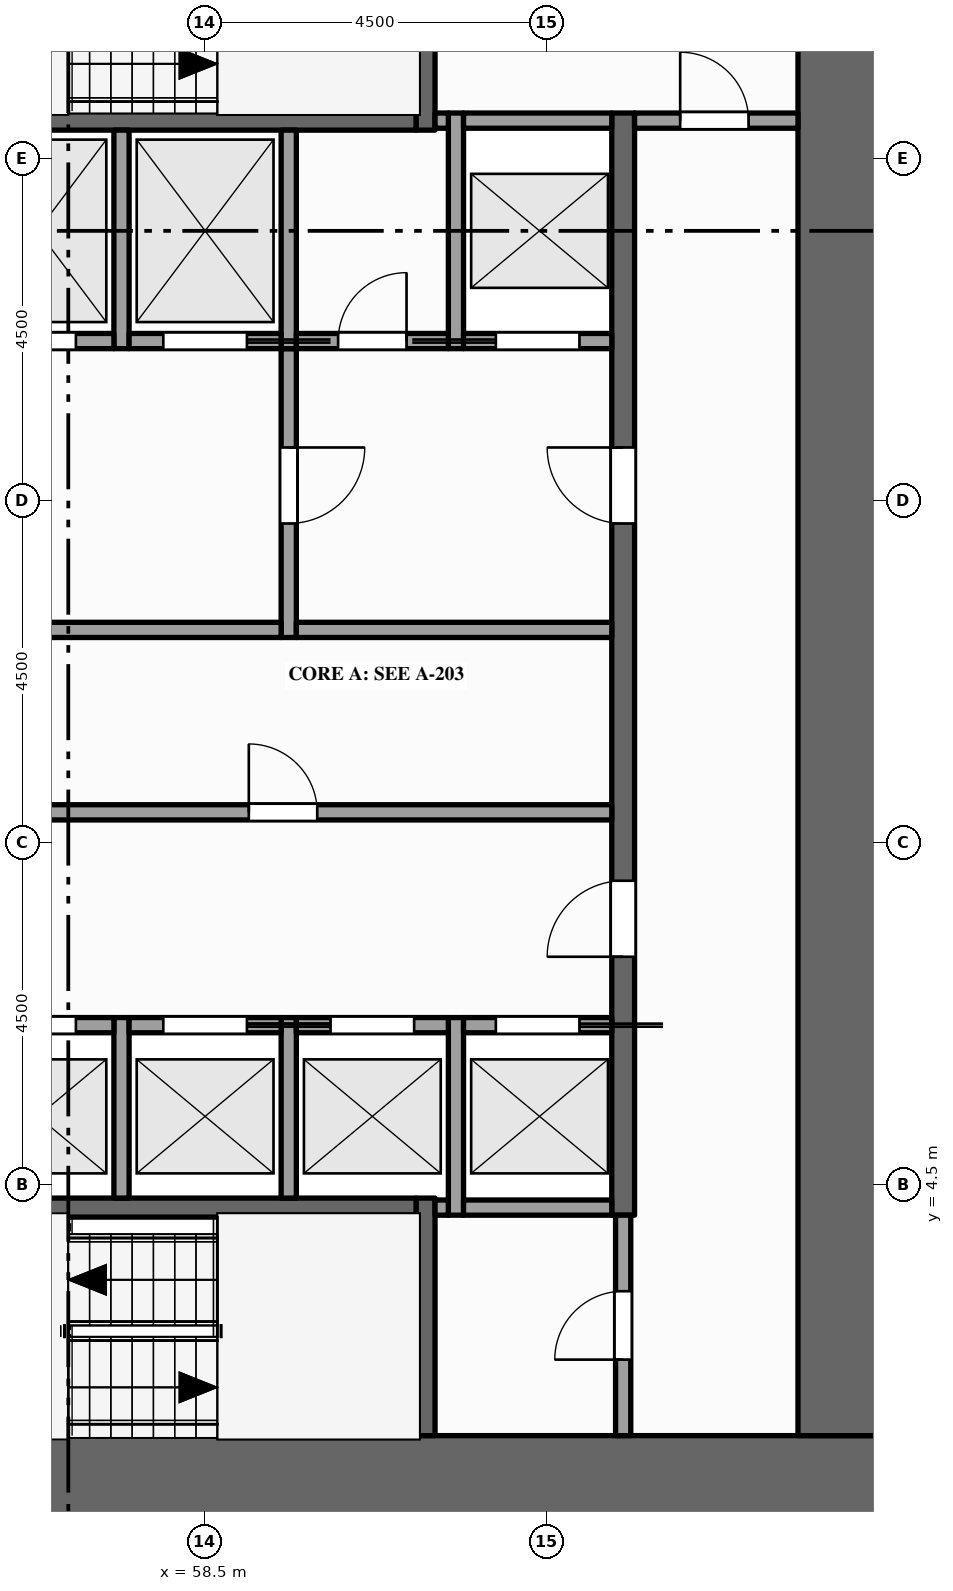
"""IFC4 building model, lengths in metres.
Left out: names, types, materials, properties, quantities, classifications, styles, units other than length and angle.
Written with IfcOpenShell. Run it as: python <this file> out.ifc"""

import sys

from ifc_helpers import new_model, si_unit, direction, frame, frame_2d, origin, place, context, subcontext, project, spatial, rectangle, extrude, element, fill, save


model = new_model("IFC4")
c1 = context("Model", 3, precision=1e-05, world=origin(), true_north=direction((0.0, 1.0)))
c2 = subcontext(c1, "Body", "Model", "MODEL_VIEW")
j1 = project(units=[si_unit("LENGTHUNIT", "METRE"), si_unit("PLANEANGLEUNIT", "RADIAN")], contexts=[c1])
p1 = place(None, origin())
s1 = spatial("IfcSite", under=j1, at=p1, CompositionType="ELEMENT")
p2 = place(p1, origin())
s2 = spatial("IfcBuilding", under=s1, at=p2, CompositionType="ELEMENT")
p3 = place(p2, frame((0.0, 0.0, 14.0)))
s3 = spatial("IfcBuildingStorey", under=s2, at=p3, CompositionType="ELEMENT", Elevation=14.0)
p4 = place(p3, frame((67.5, 0.6, -0.15), z_axis=(0.0, 0.0, 1.0), x_axis=(-1.0, 0.0, 0.0)))
e1 = element("IfcWall", 1, at=p4, inside=s3, PredefinedType="SHEAR", context=c2, shape_type="SweptSolid", body=[
    extrude(rectangle(XDim=13.5, YDim=1.2, at=frame_2d((6.75, 0.0))), origin(), (0.0, 0.0, 1.0), 5.0),
])
p5 = place(p3, frame((66.9, 1.2, -0.15), z_axis=(0.0, 0.0, 1.0), x_axis=(0.0, 1.0, 0.0)))
e2 = element("IfcWall", 2, at=p5, inside=s3, PredefinedType="SHEAR", context=c2, shape_type="SweptSolid", body=[
    extrude(rectangle(XDim=20.1, YDim=1.2, at=frame_2d((10.05, 0.0))), origin(), (0.0, 0.0, 1.0), 5.0),
])
p6 = place(p3, frame((57.4, 4.325, 0.0), z_axis=(0.0, 0.0, 1.0), x_axis=(0.0, 1.0, 0.0)))
e3 = element("IfcWall", 3, at=p6, inside=s3, PredefinedType="SOLIDWALL", context=c2, shape_type="SweptSolid", body=[
    extrude(rectangle(XDim=2.375, YDim=0.2, at=frame_2d((1.188, 0.0))), origin(), (0.0, 0.0, 1.0), 4.75),
])
p7 = place(p3, frame((57.4, 15.5, 0.0), z_axis=(0.0, 0.0, 1.0), x_axis=(0.0, 1.0, 0.0)))
e4 = element("IfcWall", 4, at=p7, inside=s3, PredefinedType="SOLIDWALL", context=c2, shape_type="SweptSolid", body=[
    extrude(rectangle(XDim=2.875, YDim=0.2, at=frame_2d((1.438, 0.0))), origin(), (0.0, 0.0, 1.0), 4.75),
])
p8 = place(p3, frame((59.6, 4.325, 0.0), z_axis=(0.0, 0.0, 1.0), x_axis=(0.0, 1.0, 0.0)))
e5 = element("IfcWall", 5, at=p8, inside=s3, PredefinedType="SOLIDWALL", context=c2, shape_type="SweptSolid", body=[
    extrude(rectangle(XDim=2.375, YDim=0.2, at=frame_2d((1.188, 0.0))), origin(), (0.0, 0.0, 1.0), 4.75),
])
p9 = place(p3, frame((59.6, 11.7, 0.0), z_axis=(0.0, 0.0, 1.0), x_axis=(0.0, 1.0, 0.0)))
e6 = element("IfcWall", 6, at=p9, inside=s3, PredefinedType="PARTITIONING", context=c2, shape_type="SweptSolid", body=[
    extrude(rectangle(XDim=3.8, YDim=0.2, at=frame_2d((1.9, 0.0))), origin(), (0.0, 0.0, 1.0), 4.75),
])
p10 = place(p9, frame((1.5, 0.0, 0.0)))
e7 = element("IfcOpeningElement", 7, at=p10, cuts=e6, PredefinedType="OPENING", context=c2, shape_type="SweptSolid", body=[
    extrude(rectangle(XDim=1.0, YDim=2.1, at=frame_2d((0.5, 1.05))), frame((0.0, 0.11, 0.0), z_axis=(0.0, -1.0, 0.0), x_axis=(1.0, 0.0, 0.0)), (0.0, 0.0, 1.0), 0.22),
])
p11 = place(p3, frame((59.6, 15.5, 0.0), z_axis=(0.0, 0.0, 1.0), x_axis=(0.0, 1.0, 0.0)))
e8 = element("IfcWall", 8, at=p11, inside=s3, PredefinedType="SOLIDWALL", context=c2, shape_type="SweptSolid", body=[
    extrude(rectangle(XDim=2.875, YDim=0.2, at=frame_2d((1.438, 0.0))), origin(), (0.0, 0.0, 1.0), 4.75),
])
p12 = place(p3, frame((61.4, 1.2, 0.0), z_axis=(0.0, 0.0, 1.0), x_axis=(0.0, 1.0, 0.0)))
e9 = element("IfcWall", 9, at=p12, inside=s3, PredefinedType="SHEAR", context=c2, shape_type="SweptSolid", body=[
    extrude(rectangle(XDim=3.125, YDim=0.25, at=frame_2d((1.562, 0.0))), origin(), (0.0, 0.0, 1.0), 4.75),
])
p13 = place(p3, frame((61.4, 18.375, 0.0), z_axis=(0.0, 0.0, 1.0), x_axis=(0.0, 1.0, 0.0)))
e10 = element("IfcWall", 10, at=p13, inside=s3, PredefinedType="SHEAR", context=c2, shape_type="SweptSolid", body=[
    extrude(rectangle(XDim=2.925, YDim=0.25, at=frame_2d((1.462, 0.0))), origin(), (0.0, 0.0, 1.0), 4.75),
])
p14 = place(p3, frame((61.8, 4.1, 0.0), z_axis=(0.0, 0.0, 1.0), x_axis=(0.0, 1.0, 0.0)))
e11 = element("IfcWall", 11, at=p14, inside=s3, PredefinedType="SOLIDWALL", context=c2, shape_type="SweptSolid", body=[
    extrude(rectangle(XDim=2.6, YDim=0.2, at=frame_2d((1.3, 0.0))), origin(), (0.0, 0.0, 1.0), 4.75),
])
p15 = place(p3, frame((61.8, 15.5, 0.0), z_axis=(0.0, 0.0, 1.0), x_axis=(0.0, 1.0, 0.0)))
e12 = element("IfcWall", 12, at=p15, inside=s3, PredefinedType="SOLIDWALL", context=c2, shape_type="SweptSolid", body=[
    extrude(rectangle(XDim=3.1, YDim=0.2, at=frame_2d((1.55, 0.0))), origin(), (0.0, 0.0, 1.0), 4.75),
])
p16 = place(p3, frame((64.0, 1.2, 0.0), z_axis=(0.0, 0.0, 1.0), x_axis=(0.0, 1.0, 0.0)))
e13 = element("IfcWall", 13, at=p16, inside=s3, PredefinedType="PARTITIONING", context=c2, shape_type="SweptSolid", body=[
    extrude(rectangle(XDim=2.9, YDim=0.2, at=frame_2d((1.45, 0.0))), origin(), (0.0, 0.0, 1.0), 4.75),
])
p17 = place(p16, frame((1.0, 0.0, 0.0)))
e14 = element("IfcOpeningElement", 14, at=p17, cuts=e13, PredefinedType="OPENING", context=c2, shape_type="SweptSolid", body=[
    extrude(rectangle(XDim=0.9, YDim=2.1, at=frame_2d((0.45, 1.05))), frame((0.0, 0.11, 0.0), z_axis=(0.0, -1.0, 0.0), x_axis=(1.0, 0.0, 0.0)), (0.0, 0.0, 1.0), 0.22),
])
p18 = place(p3, frame((64.0, 4.1, 0.0), z_axis=(0.0, 0.0, 1.0), x_axis=(0.0, 1.0, 0.0)))
e15 = element("IfcWall", 15, at=p18, inside=s3, PredefinedType="SHEAR", context=c2, shape_type="SweptSolid", body=[
    extrude(rectangle(XDim=14.5, YDim=0.3, at=frame_2d((7.25, 0.0))), origin(), (0.0, 0.0, 1.0), 4.75),
])
p19 = place(p18, frame((3.4, 0.0, 0.0)))
e16 = element("IfcOpeningElement", 16, at=p19, cuts=e15, PredefinedType="OPENING", context=c2, shape_type="SweptSolid", body=[
    extrude(rectangle(XDim=1.0, YDim=2.1, at=frame_2d((0.5, 1.05))), frame((0.0, 0.16, 0.0), z_axis=(0.0, -1.0, 0.0), x_axis=(1.0, 0.0, 0.0)), (0.0, 0.0, 1.0), 0.32),
])
p20 = place(p18, frame((9.1, 0.0, 0.0)))
e17 = element("IfcOpeningElement", 17, at=p20, cuts=e15, PredefinedType="OPENING", context=c2, shape_type="SweptSolid", body=[
    extrude(rectangle(XDim=1.0, YDim=2.1, at=frame_2d((0.5, 1.05))), frame((0.0, 0.16, 0.0), z_axis=(0.0, -1.0, 0.0), x_axis=(1.0, 0.0, 0.0)), (0.0, 0.0, 1.0), 0.32),
])
p21 = place(p3, frame((55.2, 4.2, 0.0), z_axis=(0.0, 0.0, 1.0), x_axis=(1.0, 0.0, 0.0)))
e18 = element("IfcWall", 18, at=p21, inside=s3, PredefinedType="SHEAR", context=c2, shape_type="SweptSolid", body=[
    extrude(rectangle(XDim=6.075, YDim=0.25, at=frame_2d((3.038, 0.0))), origin(), (0.0, 0.0, 1.0), 4.75),
])
p22 = place(p3, frame((61.525, 4.2, 0.0), z_axis=(0.0, 0.0, 1.0), x_axis=(1.0, 0.0, 0.0)))
e19 = element("IfcWall", 19, at=p22, inside=s3, PredefinedType="SOLIDWALL", context=c2, shape_type="SweptSolid", body=[
    extrude(rectangle(XDim=0.175, YDim=0.2, at=frame_2d((0.087, 0.0))), origin(), (0.0, 0.0, 1.0), 4.75),
])
p23 = place(p3, frame((61.9, 4.2, 0.0), z_axis=(0.0, 0.0, 1.0), x_axis=(1.0, 0.0, 0.0)))
e20 = element("IfcWall", 20, at=p23, inside=s3, PredefinedType="SOLIDWALL", context=c2, shape_type="SweptSolid", body=[
    extrude(rectangle(XDim=1.95, YDim=0.2, at=frame_2d((0.975, 0.0))), origin(), (0.0, 0.0, 1.0), 4.75),
])
p24 = place(p3, frame((55.2, 6.6, 0.0), z_axis=(0.0, 0.0, 1.0), x_axis=(1.0, 0.0, 0.0)))
e21 = element("IfcWall", 21, at=p24, inside=s3, PredefinedType="SOLIDWALL", context=c2, shape_type="SweptSolid", body=[
    extrude(rectangle(XDim=2.1, YDim=0.2, at=frame_2d((1.05, 0.0))), origin(), (0.0, 0.0, 1.0), 4.75),
])
p25 = place(p24, frame((0.5, 0.0, 0.012)))
e22 = element("IfcOpeningElement", 22, at=p25, cuts=e21, PredefinedType="OPENING", context=c2, shape_type="SweptSolid", body=[
    extrude(rectangle(XDim=1.1, YDim=2.1, at=frame_2d((0.55, 1.05))), frame((0.0, 0.11, 0.0), z_axis=(0.0, -1.0, 0.0), x_axis=(1.0, 0.0, 0.0)), (0.0, 0.0, 1.0), 0.22),
])
p26 = place(p3, frame((57.5, 6.6, 0.0), z_axis=(0.0, 0.0, 1.0), x_axis=(1.0, 0.0, 0.0)))
e23 = element("IfcWall", 23, at=p26, inside=s3, PredefinedType="SOLIDWALL", context=c2, shape_type="SweptSolid", body=[
    extrude(rectangle(XDim=2.0, YDim=0.2, at=frame_2d((1.0, 0.0))), origin(), (0.0, 0.0, 1.0), 4.75),
])
p27 = place(p26, frame((0.45, 0.0, 0.012)))
e24 = element("IfcOpeningElement", 24, at=p27, cuts=e23, PredefinedType="OPENING", context=c2, shape_type="SweptSolid", body=[
    extrude(rectangle(XDim=1.1, YDim=2.1, at=frame_2d((0.55, 1.05))), frame((0.0, 0.11, 0.0), z_axis=(0.0, -1.0, 0.0), x_axis=(1.0, 0.0, 0.0)), (0.0, 0.0, 1.0), 0.22),
])
p28 = place(p3, frame((59.7, 6.6, 0.0), z_axis=(0.0, 0.0, 1.0), x_axis=(1.0, 0.0, 0.0)))
e25 = element("IfcWall", 25, at=p28, inside=s3, PredefinedType="SOLIDWALL", context=c2, shape_type="SweptSolid", body=[
    extrude(rectangle(XDim=2.0, YDim=0.2, at=frame_2d((1.0, 0.0))), origin(), (0.0, 0.0, 1.0), 4.75),
])
p29 = place(p28, frame((0.45, 0.0, 0.012)))
e26 = element("IfcOpeningElement", 26, at=p29, cuts=e25, PredefinedType="OPENING", context=c2, shape_type="SweptSolid", body=[
    extrude(rectangle(XDim=1.1, YDim=2.1, at=frame_2d((0.55, 1.05))), frame((0.0, 0.11, 0.0), z_axis=(0.0, -1.0, 0.0), x_axis=(1.0, 0.0, 0.0)), (0.0, 0.0, 1.0), 0.22),
])
p30 = place(p3, frame((61.9, 6.6, 0.0), z_axis=(0.0, 0.0, 1.0), x_axis=(1.0, 0.0, 0.0)))
e27 = element("IfcWall", 27, at=p30, inside=s3, PredefinedType="SOLIDWALL", context=c2, shape_type="SweptSolid", body=[
    extrude(rectangle(XDim=1.95, YDim=0.2, at=frame_2d((0.975, 0.0))), origin(), (0.0, 0.0, 1.0), 4.75),
])
p31 = place(p30, frame((0.425, 0.0, 0.012)))
e28 = element("IfcOpeningElement", 28, at=p31, cuts=e27, PredefinedType="OPENING", context=c2, shape_type="SweptSolid", body=[
    extrude(rectangle(XDim=1.1, YDim=2.1, at=frame_2d((0.55, 1.05))), frame((0.0, 0.11, 0.0), z_axis=(0.0, -1.0, 0.0), x_axis=(1.0, 0.0, 0.0)), (0.0, 0.0, 1.0), 0.22),
])
p32 = place(p3, frame((55.2, 9.4, 0.0), z_axis=(0.0, 0.0, 1.0), x_axis=(1.0, 0.0, 0.0)))
e29 = element("IfcWall", 29, at=p32, inside=s3, PredefinedType="PARTITIONING", context=c2, shape_type="SweptSolid", body=[
    extrude(rectangle(XDim=8.65, YDim=0.2, at=frame_2d((4.325, 0.0))), origin(), (0.0, 0.0, 1.0), 4.75),
])
p33 = place(p32, frame((3.875, 0.0, 0.0)))
e30 = element("IfcOpeningElement", 30, at=p33, cuts=e29, PredefinedType="OPENING", context=c2, shape_type="SweptSolid", body=[
    extrude(rectangle(XDim=0.9, YDim=2.1, at=frame_2d((0.45, 1.05))), frame((0.0, 0.11, 0.0), z_axis=(0.0, -1.0, 0.0), x_axis=(1.0, 0.0, 0.0)), (0.0, 0.0, 1.0), 0.22),
])
p34 = place(p3, frame((55.2, 11.8, 0.0), z_axis=(0.0, 0.0, 1.0), x_axis=(1.0, 0.0, 0.0)))
e31 = element("IfcWall", 31, at=p34, inside=s3, PredefinedType="PARTITIONING", context=c2, shape_type="SweptSolid", body=[
    extrude(rectangle(XDim=4.3, YDim=0.2, at=frame_2d((2.15, 0.0))), origin(), (0.0, 0.0, 1.0), 4.75),
])
p35 = place(p3, frame((59.7, 11.8, 0.0), z_axis=(0.0, 0.0, 1.0), x_axis=(1.0, 0.0, 0.0)))
e32 = element("IfcWall", 32, at=p35, inside=s3, PredefinedType="PARTITIONING", context=c2, shape_type="SweptSolid", body=[
    extrude(rectangle(XDim=4.15, YDim=0.2, at=frame_2d((2.075, 0.0))), origin(), (0.0, 0.0, 1.0), 4.75),
])
p36 = place(p3, frame((55.2, 15.6, 0.0), z_axis=(0.0, 0.0, 1.0), x_axis=(1.0, 0.0, 0.0)))
e33 = element("IfcWall", 33, at=p36, inside=s3, PredefinedType="SOLIDWALL", context=c2, shape_type="SweptSolid", body=[
    extrude(rectangle(XDim=2.1, YDim=0.2, at=frame_2d((1.05, 0.0))), origin(), (0.0, 0.0, 1.0), 4.75),
])
p37 = place(p36, frame((0.5, 0.0, 0.012)))
e34 = element("IfcOpeningElement", 34, at=p37, cuts=e33, PredefinedType="OPENING", context=c2, shape_type="SweptSolid", body=[
    extrude(rectangle(XDim=1.1, YDim=2.1, at=frame_2d((0.55, 1.05))), frame((0.0, 0.11, 0.0), z_axis=(0.0, -1.0, 0.0), x_axis=(1.0, 0.0, 0.0)), (0.0, 0.0, 1.0), 0.22),
])
p38 = place(p3, frame((57.5, 15.6, 0.0), z_axis=(0.0, 0.0, 1.0), x_axis=(1.0, 0.0, 0.0)))
e35 = element("IfcWall", 35, at=p38, inside=s3, PredefinedType="SOLIDWALL", context=c2, shape_type="SweptSolid", body=[
    extrude(rectangle(XDim=2.0, YDim=0.2, at=frame_2d((1.0, 0.0))), origin(), (0.0, 0.0, 1.0), 4.75),
])
p39 = place(p38, frame((0.45, 0.0, 0.012)))
e36 = element("IfcOpeningElement", 36, at=p39, cuts=e35, PredefinedType="OPENING", context=c2, shape_type="SweptSolid", body=[
    extrude(rectangle(XDim=1.1, YDim=2.1, at=frame_2d((0.55, 1.05))), frame((0.0, 0.11, 0.0), z_axis=(0.0, -1.0, 0.0), x_axis=(1.0, 0.0, 0.0)), (0.0, 0.0, 1.0), 0.22),
])
p40 = place(p3, frame((59.7, 15.6, 0.0), z_axis=(0.0, 0.0, 1.0), x_axis=(1.0, 0.0, 0.0)))
e37 = element("IfcWall", 37, at=p40, inside=s3, PredefinedType="PARTITIONING", context=c2, shape_type="SweptSolid", body=[
    extrude(rectangle(XDim=2.0, YDim=0.2, at=frame_2d((1.0, 0.0))), origin(), (0.0, 0.0, 1.0), 4.75),
])
p41 = place(p40, frame((0.55, 0.0, 0.0)))
e38 = element("IfcOpeningElement", 38, at=p41, cuts=e37, PredefinedType="OPENING", context=c2, shape_type="SweptSolid", body=[
    extrude(rectangle(XDim=0.9, YDim=2.1, at=frame_2d((0.45, 1.05))), frame((0.0, 0.11, 0.0), z_axis=(0.0, -1.0, 0.0), x_axis=(1.0, 0.0, 0.0)), (0.0, 0.0, 1.0), 0.22),
])
p42 = place(p3, frame((61.9, 15.6, 0.0), z_axis=(0.0, 0.0, 1.0), x_axis=(1.0, 0.0, 0.0)))
e39 = element("IfcWall", 39, at=p42, inside=s3, PredefinedType="SOLIDWALL", context=c2, shape_type="SweptSolid", body=[
    extrude(rectangle(XDim=1.95, YDim=0.2, at=frame_2d((0.975, 0.0))), origin(), (0.0, 0.0, 1.0), 4.75),
])
p43 = place(p42, frame((0.425, 0.0, 0.012)))
e40 = element("IfcOpeningElement", 40, at=p43, cuts=e39, PredefinedType="OPENING", context=c2, shape_type="SweptSolid", body=[
    extrude(rectangle(XDim=1.1, YDim=2.1, at=frame_2d((0.55, 1.05))), frame((0.0, 0.11, 0.0), z_axis=(0.0, -1.0, 0.0), x_axis=(1.0, 0.0, 0.0)), (0.0, 0.0, 1.0), 0.22),
])
p44 = place(p3, frame((55.2, 18.5, 0.0), z_axis=(0.0, 0.0, 1.0), x_axis=(1.0, 0.0, 0.0)))
e41 = element("IfcWall", 41, at=p44, inside=s3, PredefinedType="SHEAR", context=c2, shape_type="SweptSolid", body=[
    extrude(rectangle(XDim=6.075, YDim=0.25, at=frame_2d((3.038, 0.0))), origin(), (0.0, 0.0, 1.0), 4.75),
])
p45 = place(p3, frame((61.525, 18.5, 0.0), z_axis=(0.0, 0.0, 1.0), x_axis=(1.0, 0.0, 0.0)))
e42 = element("IfcWall", 42, at=p45, inside=s3, PredefinedType="PARTITIONING", context=c2, shape_type="SweptSolid", body=[
    extrude(rectangle(XDim=0.175, YDim=0.2, at=frame_2d((0.087, 0.0))), origin(), (0.0, 0.0, 1.0), 4.75),
])
p46 = place(p3, frame((61.9, 18.5, 0.0), z_axis=(0.0, 0.0, 1.0), x_axis=(1.0, 0.0, 0.0)))
e43 = element("IfcWall", 43, at=p46, inside=s3, PredefinedType="SOLIDWALL", context=c2, shape_type="SweptSolid", body=[
    extrude(rectangle(XDim=1.95, YDim=0.2, at=frame_2d((0.975, 0.0))), origin(), (0.0, 0.0, 1.0), 4.75),
])
p47 = place(p3, frame((64.15, 18.5, 0.0), z_axis=(0.0, 0.0, 1.0), x_axis=(1.0, 0.0, 0.0)))
e44 = element("IfcWall", 44, at=p47, inside=s3, PredefinedType="PARTITIONING", context=c2, shape_type="SweptSolid", body=[
    extrude(rectangle(XDim=2.15, YDim=0.2, at=frame_2d((1.075, 0.0))), origin(), (0.0, 0.0, 1.0), 4.75),
])
p48 = place(p47, frame((0.6, 0.0, 0.0)))
e45 = element("IfcOpeningElement", 45, at=p48, cuts=e44, PredefinedType="OPENING", context=c2, shape_type="SweptSolid", body=[
    extrude(rectangle(XDim=0.9, YDim=2.1, at=frame_2d((0.45, 1.05))), frame((0.0, 0.11, 0.0), z_axis=(0.0, -1.0, 0.0), x_axis=(1.0, 0.0, 0.0)), (0.0, 0.0, 1.0), 0.22),
])
p49 = place(p25, origin())
e46 = element("IfcDoor", 46, at=p49, inside=s3, OperationType="SLIDING_TO_LEFT", PredefinedType="DOOR", context=c2, shape_type="SweptSolid", body=[
    extrude(rectangle(XDim=1.1, YDim=2.1, at=frame_2d((0.55, 1.05))), frame((0.0, 0.025, 0.0), z_axis=(0.0, -1.0, 0.0), x_axis=(1.0, 0.0, 0.0)), (0.0, 0.0, 1.0), 0.05),
])
fill(e22, e46)
p50 = place(p27, origin())
e47 = element("IfcDoor", 47, at=p50, inside=s3, OperationType="SLIDING_TO_RIGHT", PredefinedType="DOOR", context=c2, shape_type="SweptSolid", body=[
    extrude(rectangle(XDim=1.1, YDim=2.1, at=frame_2d((0.55, 1.05))), frame((0.0, 0.025, 0.0), z_axis=(0.0, -1.0, 0.0), x_axis=(1.0, 0.0, 0.0)), (0.0, 0.0, 1.0), 0.05),
])
fill(e24, e47)
p51 = place(p29, origin())
e48 = element("IfcDoor", 48, at=p51, inside=s3, OperationType="SLIDING_TO_LEFT", PredefinedType="DOOR", context=c2, shape_type="SweptSolid", body=[
    extrude(rectangle(XDim=1.1, YDim=2.1, at=frame_2d((0.55, 1.05))), frame((0.0, 0.025, 0.0), z_axis=(0.0, -1.0, 0.0), x_axis=(1.0, 0.0, 0.0)), (0.0, 0.0, 1.0), 0.05),
])
fill(e26, e48)
p52 = place(p31, origin())
e49 = element("IfcDoor", 49, at=p52, inside=s3, OperationType="SLIDING_TO_RIGHT", PredefinedType="DOOR", context=c2, shape_type="SweptSolid", body=[
    extrude(rectangle(XDim=1.1, YDim=2.1, at=frame_2d((0.55, 1.05))), frame((0.0, 0.025, 0.0), z_axis=(0.0, -1.0, 0.0), x_axis=(1.0, 0.0, 0.0)), (0.0, 0.0, 1.0), 0.05),
])
fill(e28, e49)
p53 = place(p37, origin())
e50 = element("IfcDoor", 50, at=p53, inside=s3, OperationType="SLIDING_TO_LEFT", PredefinedType="DOOR", context=c2, shape_type="SweptSolid", body=[
    extrude(rectangle(XDim=1.1, YDim=2.1, at=frame_2d((0.55, 1.05))), frame((0.0, 0.025, 0.0), z_axis=(0.0, -1.0, 0.0), x_axis=(1.0, 0.0, 0.0)), (0.0, 0.0, 1.0), 0.05),
])
fill(e34, e50)
p54 = place(p39, origin())
e51 = element("IfcDoor", 51, at=p54, inside=s3, OperationType="SLIDING_TO_RIGHT", PredefinedType="DOOR", context=c2, shape_type="SweptSolid", body=[
    extrude(rectangle(XDim=1.1, YDim=2.1, at=frame_2d((0.55, 1.05))), frame((0.0, 0.025, 0.0), z_axis=(0.0, -1.0, 0.0), x_axis=(1.0, 0.0, 0.0)), (0.0, 0.0, 1.0), 0.05),
])
fill(e36, e51)
p55 = place(p43, origin())
e52 = element("IfcDoor", 52, at=p55, inside=s3, OperationType="SLIDING_TO_LEFT", PredefinedType="DOOR", context=c2, shape_type="SweptSolid", body=[
    extrude(rectangle(XDim=1.1, YDim=2.1, at=frame_2d((0.55, 1.05))), frame((0.0, 0.025, 0.0), z_axis=(0.0, -1.0, 0.0), x_axis=(1.0, 0.0, 0.0)), (0.0, 0.0, 1.0), 0.05),
])
fill(e40, e52)
p56 = place(p19, origin())
e53 = element("IfcDoor", 53, at=p56, inside=s3, OperationType="SINGLE_SWING_LEFT", PredefinedType="DOOR", context=c2, shape_type="SweptSolid", body=[
    extrude(rectangle(XDim=1.0, YDim=2.1, at=frame_2d((0.5, 1.05))), frame((0.0, 0.025, 0.0), z_axis=(0.0, -1.0, 0.0), x_axis=(1.0, 0.0, 0.0)), (0.0, 0.0, 1.0), 0.05),
])
fill(e16, e53)
p57 = place(p10, origin())
e54 = element("IfcDoor", 54, at=p57, inside=s3, OperationType="SINGLE_SWING_RIGHT", PredefinedType="DOOR", context=c2, shape_type="SweptSolid", body=[
    extrude(rectangle(XDim=1.0, YDim=2.1, at=frame_2d((0.5, 1.05))), frame((0.0, 0.025, 0.0), z_axis=(0.0, -1.0, 0.0), x_axis=(1.0, 0.0, 0.0)), (0.0, 0.0, 1.0), 0.05),
])
fill(e7, e54)
p58 = place(p20, origin())
e55 = element("IfcDoor", 55, at=p58, inside=s3, OperationType="SINGLE_SWING_RIGHT", PredefinedType="DOOR", context=c2, shape_type="SweptSolid", body=[
    extrude(rectangle(XDim=1.0, YDim=2.1, at=frame_2d((0.5, 1.05))), frame((0.0, 0.025, 0.0), z_axis=(0.0, -1.0, 0.0), x_axis=(1.0, 0.0, 0.0)), (0.0, 0.0, 1.0), 0.05),
])
fill(e17, e55)
p59 = place(p17, origin())
e56 = element("IfcDoor", 56, at=p59, inside=s3, OperationType="SINGLE_SWING_LEFT", PredefinedType="DOOR", context=c2, shape_type="SweptSolid", body=[
    extrude(rectangle(XDim=0.9, YDim=2.1, at=frame_2d((0.45, 1.05))), frame((0.0, 0.025, 0.0), z_axis=(0.0, -1.0, 0.0), x_axis=(1.0, 0.0, 0.0)), (0.0, 0.0, 1.0), 0.05),
])
fill(e14, e56)
p60 = place(p48, origin())
e57 = element("IfcDoor", 57, at=p60, inside=s3, OperationType="SINGLE_SWING_LEFT", PredefinedType="DOOR", context=c2, shape_type="SweptSolid", body=[
    extrude(rectangle(XDim=0.9, YDim=2.1, at=frame_2d((0.45, 1.05))), frame((0.0, 0.025, 0.0), z_axis=(0.0, -1.0, 0.0), x_axis=(1.0, 0.0, 0.0)), (0.0, 0.0, 1.0), 0.05),
])
fill(e45, e57)
p61 = place(p33, origin())
e58 = element("IfcDoor", 58, at=p61, inside=s3, OperationType="SINGLE_SWING_LEFT", PredefinedType="DOOR", context=c2, shape_type="SweptSolid", body=[
    extrude(rectangle(XDim=0.9, YDim=2.1, at=frame_2d((0.45, 1.05))), frame((0.0, 0.025, 0.0), z_axis=(0.0, -1.0, 0.0), x_axis=(1.0, 0.0, 0.0)), (0.0, 0.0, 1.0), 0.05),
])
fill(e30, e58)
p62 = place(p41, origin())
e59 = element("IfcDoor", 59, at=p62, inside=s3, OperationType="SINGLE_SWING_RIGHT", PredefinedType="DOOR", context=c2, shape_type="SweptSolid", body=[
    extrude(rectangle(XDim=0.9, YDim=2.1, at=frame_2d((0.45, 1.05))), frame((0.0, 0.025, 0.0), z_axis=(0.0, -1.0, 0.0), x_axis=(1.0, 0.0, 0.0)), (0.0, 0.0, 1.0), 0.05),
])
fill(e38, e59)
save(model, sys.argv[1])
